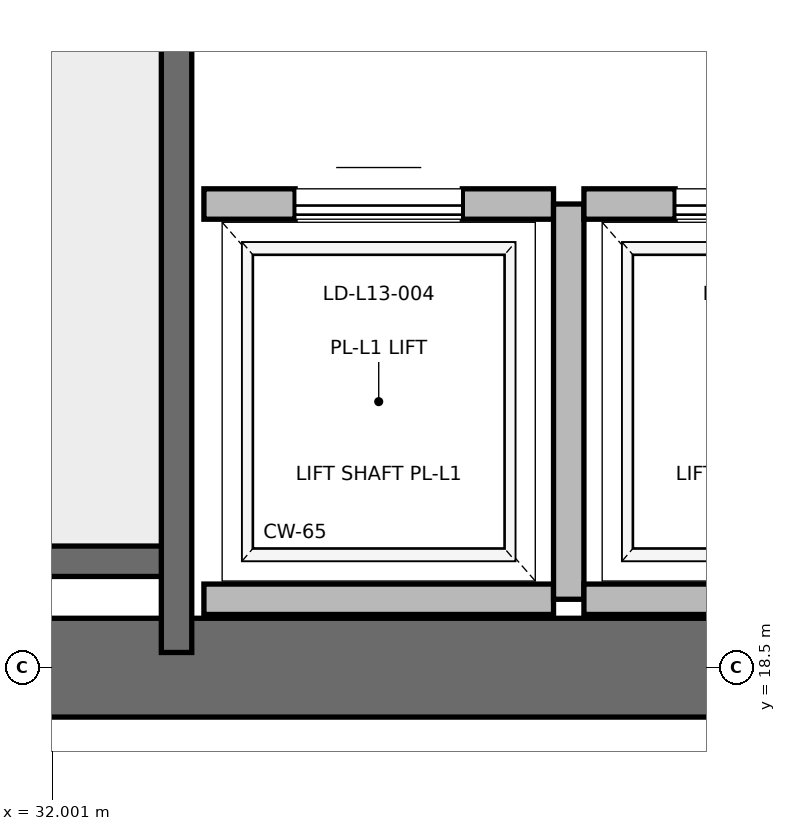
"""IFC4 building model, lengths in metres.
Left out: names, types, materials, properties, quantities, classifications, styles, units other than length and angle.
Written with IfcOpenShell. Run it as: python <this file> out.ifc"""

import sys

from ifc_helpers import new_model, si_unit, direction, frame, frame_2d, origin, place, context, subcontext, project, spatial, rectangle, extrude, element, fill, save


model = new_model("IFC4")
c1 = context("Model", 3, precision=1e-05, world=origin(), true_north=direction((0.0, 1.0)))
c2 = subcontext(c1, "Body", "Model", "MODEL_VIEW")
j1 = project(units=[si_unit("LENGTHUNIT", "METRE"), si_unit("PLANEANGLEUNIT", "RADIAN")], contexts=[c1])
p1 = place(None, origin())
s1 = spatial("IfcSite", under=j1, at=p1, CompositionType="ELEMENT")
p2 = place(p1, origin())
s2 = spatial("IfcBuilding", under=s1, at=p2, CompositionType="ELEMENT")
p3 = place(p2, frame((0.0, 0.0, 59.6)))
s3 = spatial("IfcBuildingStorey", under=s2, at=p3, CompositionType="ELEMENT", Elevation=59.6)
p4 = place(p3, frame((29.0, 18.5, 0.0), z_axis=(0.0, 0.0, 1.0), x_axis=(1.0, 0.0, 0.0)))
e1 = element("IfcWall", 1, at=p4, inside=s3, PredefinedType="SHEAR", context=c2, shape_type="SweptSolid", body=[
    extrude(rectangle(XDim=9.2, YDim=0.65, at=frame_2d((4.6, 0.0))), origin(), (0.0, 0.0, 1.0), 3.76),
])
p5 = place(p3, frame((29.7, 19.2, 0.0), z_axis=(0.0, 0.0, 1.0), x_axis=(1.0, 0.0, 0.0)))
e2 = element("IfcWall", 2, at=p5, inside=s3, PredefinedType="SOLIDWALL", context=c2, shape_type="SweptSolid", body=[
    extrude(rectangle(XDim=3.12, YDim=0.2, at=frame_2d((1.56, 0.0))), origin(), (0.0, 0.0, 1.0), 3.76),
])
p6 = place(p3, frame((32.82, 18.6, 0.0), z_axis=(0.0, 0.0, 1.0), x_axis=(0.0, 1.0, 0.0)))
e3 = element("IfcWall", 3, at=p6, inside=s3, PredefinedType="SOLIDWALL", context=c2, shape_type="SweptSolid", body=[
    extrude(rectangle(XDim=8.78, YDim=0.2, at=frame_2d((4.39, 0.0))), origin(), (0.0, 0.0, 1.0), 3.76),
])
p7 = place(p3, frame((33.0, 18.95, 0.0), z_axis=(0.0, 0.0, 1.0), x_axis=(1.0, 0.0, 0.0)))
e4 = element("IfcWall", 4, at=p7, inside=s3, PredefinedType="SOLIDWALL", context=c2, shape_type="SweptSolid", body=[
    extrude(rectangle(XDim=2.3, YDim=0.2, at=frame_2d((1.15, 0.0))), origin(), (0.0, 0.0, 1.0), 3.76),
])
p8 = place(p3, frame((35.3, 21.55, 0.0), z_axis=(0.0, 0.0, 1.0), x_axis=(-1.0, 0.0, 0.0)))
e5 = element("IfcWall", 5, at=p8, inside=s3, PredefinedType="SOLIDWALL", context=c2, shape_type="SweptSolid", body=[
    extrude(rectangle(XDim=2.3, YDim=0.2, at=frame_2d((1.15, 0.0))), origin(), (0.0, 0.0, 1.0), 3.76),
])
p9 = place(p8, frame((0.6, 0.0, 0.0)))
e6 = element("IfcOpeningElement", 6, at=p9, cuts=e5, PredefinedType="OPENING", context=c2, shape_type="SweptSolid", body=[
    extrude(rectangle(XDim=1.1, YDim=2.2, at=frame_2d((0.55, 1.1))), frame((0.0, 0.1, 0.0), z_axis=(0.0, -1.0, 0.0), x_axis=(1.0, 0.0, 0.0)), (0.0, 0.0, 1.0), 0.2),
])
p10 = place(p3, frame((35.4, 18.95, 0.0), z_axis=(0.0, 0.0, 1.0), x_axis=(0.0, 1.0, 0.0)))
e7 = element("IfcWall", 7, at=p10, inside=s3, PredefinedType="SOLIDWALL", context=c2, shape_type="SweptSolid", body=[
    extrude(rectangle(XDim=2.6, YDim=0.2, at=frame_2d((1.3, 0.0))), origin(), (0.0, 0.0, 1.0), 3.76),
])
p11 = place(p3, frame((35.5, 18.95, 0.0), z_axis=(0.0, 0.0, 1.0), x_axis=(1.0, 0.0, 0.0)))
e8 = element("IfcWall", 8, at=p11, inside=s3, PredefinedType="SOLIDWALL", context=c2, shape_type="SweptSolid", body=[
    extrude(rectangle(XDim=2.3, YDim=0.2, at=frame_2d((1.15, 0.0))), origin(), (0.0, 0.0, 1.0), 2.54),
])
p12 = place(p3, frame((37.8, 21.55, 0.0), z_axis=(0.0, 0.0, 1.0), x_axis=(-1.0, 0.0, 0.0)))
e9 = element("IfcWall", 9, at=p12, inside=s3, PredefinedType="SOLIDWALL", context=c2, shape_type="SweptSolid", body=[
    extrude(rectangle(XDim=2.3, YDim=0.2, at=frame_2d((1.15, 0.0))), origin(), (0.0, 0.0, 1.0), 3.76),
])
p13 = place(p12, frame((0.6, 0.0, 0.0)))
e10 = element("IfcOpeningElement", 10, at=p13, cuts=e9, PredefinedType="OPENING", context=c2, shape_type="SweptSolid", body=[
    extrude(rectangle(XDim=1.1, YDim=2.2, at=frame_2d((0.55, 1.1))), frame((0.0, 0.1, 0.0), z_axis=(0.0, -1.0, 0.0), x_axis=(1.0, 0.0, 0.0)), (0.0, 0.0, 1.0), 0.2),
])
p14 = place(p9, origin())
e11 = element("IfcDoor", 11, at=p14, inside=s3, OperationType="SLIDING_TO_RIGHT", PredefinedType="DOOR", context=c2, shape_type="SweptSolid", body=[
    extrude(rectangle(XDim=1.1, YDim=2.2, at=frame_2d((0.55, 1.1))), frame((0.0, 0.025, 0.0), z_axis=(0.0, -1.0, 0.0), x_axis=(1.0, 0.0, 0.0)), (0.0, 0.0, 1.0), 0.05),
])
fill(e6, e11)
p15 = place(p13, origin())
e12 = element("IfcDoor", 12, at=p15, inside=s3, OperationType="SLIDING_TO_RIGHT", PredefinedType="DOOR", context=c2, shape_type="SweptSolid", body=[
    extrude(rectangle(XDim=1.1, YDim=2.2, at=frame_2d((0.55, 1.1))), frame((0.0, 0.025, 0.0), z_axis=(0.0, -1.0, 0.0), x_axis=(1.0, 0.0, 0.0)), (0.0, 0.0, 1.0), 0.05),
])
fill(e10, e12)
save(model, sys.argv[1])
